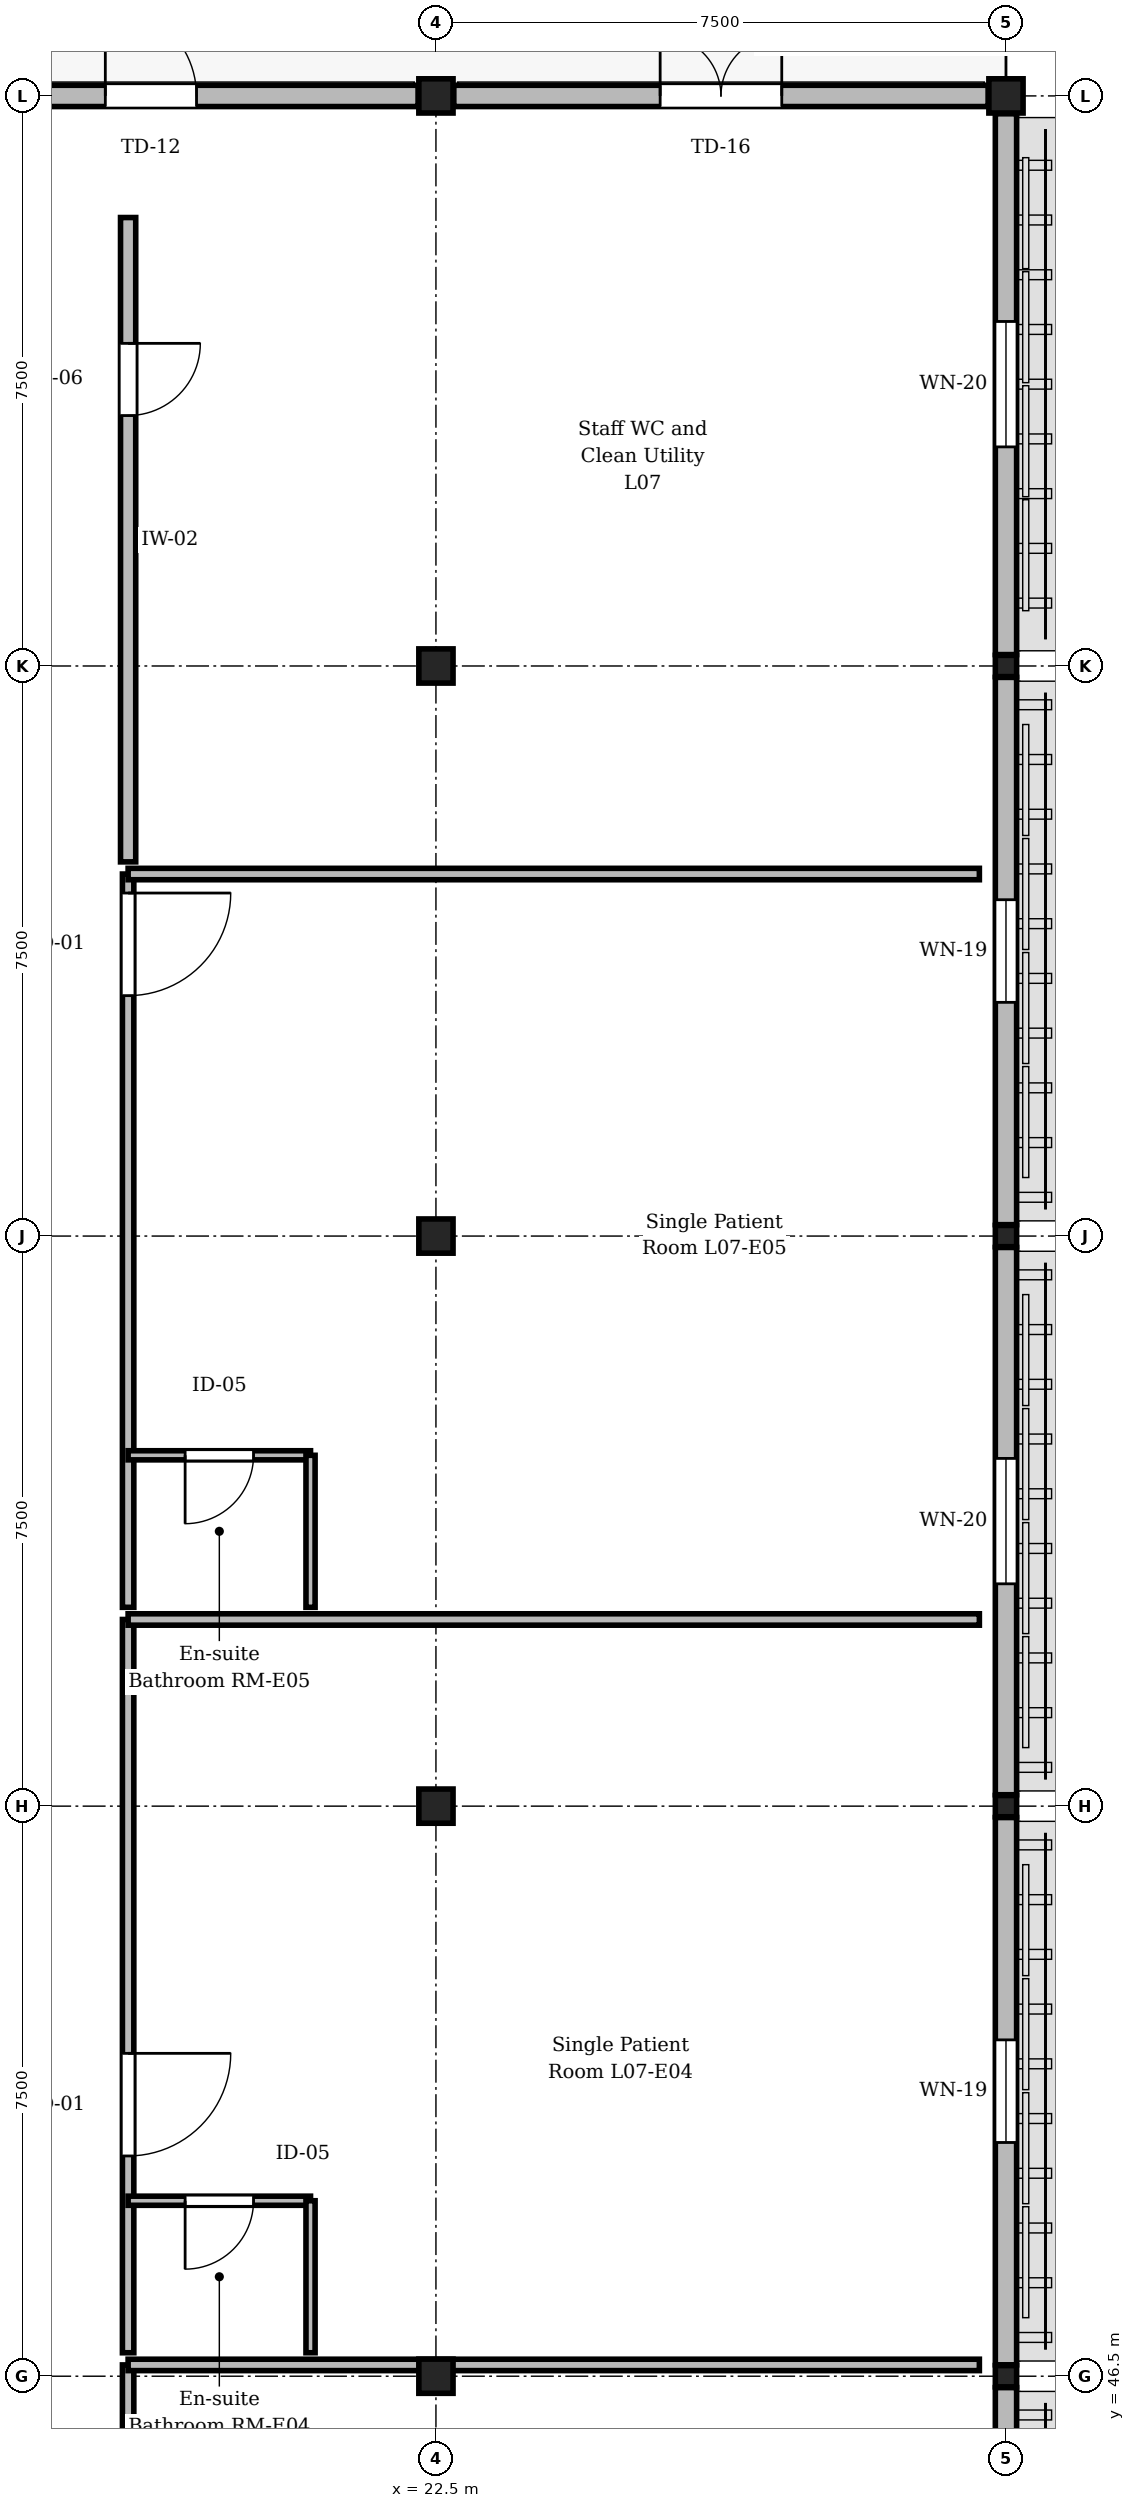
"""IFC4 building model, lengths in metres.
Left out: names, types, materials, properties, quantities, classifications, styles, units other than length and angle.
Written with IfcOpenShell. Run it as: python <this file> out.ifc"""

import sys

from ifc_helpers import new_model, si_unit, direction, frame, frame_2d, origin, origin_2d, place, context, subcontext, project, spatial, rectangle, extrude, element, fill, save


model = new_model("IFC4")
c1 = context("Model", 3, precision=1e-05, world=origin(), true_north=direction((0.0, 1.0)))
c2 = subcontext(c1, "Body", "Model", "MODEL_VIEW")
j1 = project(units=[si_unit("LENGTHUNIT", "METRE"), si_unit("PLANEANGLEUNIT", "RADIAN")], contexts=[c1])
p1 = place(None, origin())
s1 = spatial("IfcSite", under=j1, at=p1, CompositionType="ELEMENT")
p2 = place(p1, origin())
s2 = spatial("IfcBuilding", under=s1, at=p2, CompositionType="ELEMENT")
p3 = place(p2, frame((0.0, 0.0, 30.0)))
s3 = spatial("IfcBuildingStorey", under=s2, at=p3, CompositionType="ELEMENT", Elevation=30.0)
for number, where, z_axis, x_axis in (
    (1, (22.5, 46.5, 0.0), (0.0, 0.0, 1.0), (1.0, 0.0, 0.0)),
    (2, (22.5, 54.0, 0.0), (0.0, 0.0, 1.0), (1.0, 0.0, 0.0)),
    (3, (22.5, 61.5, 0.0), (0.0, 0.0, 1.0), (1.0, 0.0, 0.0)),
    (4, (22.5, 69.0, 0.0), (0.0, 0.0, 1.0), (1.0, 0.0, 0.0)),
    (5, (22.5, 76.5, 0.0), (0.0, 0.0, 1.0), (1.0, 0.0, 0.0)),
):
    element("IfcColumn", number, at=place(p3, frame(where, z_axis=z_axis, x_axis=x_axis)), inside=s3, PredefinedType="COLUMN", context=c2, shape_type="SweptSolid", body=[
        extrude(rectangle(XDim=0.45, YDim=0.45, at=origin_2d()), origin(), (0.0, 0.0, 1.0), 4.05),
    ])
for number, where, z_axis, x_axis in (
    (6, (30.0, 46.5, 0.0), (0.0, 0.0, 1.0), (1.0, 0.0, 0.0)),
    (7, (30.0, 54.0, 0.0), (0.0, 0.0, 1.0), (1.0, 0.0, 0.0)),
    (8, (30.0, 61.5, 0.0), (0.0, 0.0, 1.0), (1.0, 0.0, 0.0)),
    (9, (30.0, 69.0, 0.0), (0.0, 0.0, 1.0), (1.0, 0.0, 0.0)),
):
    element("IfcColumn", number, at=place(p3, frame(where, z_axis=z_axis, x_axis=x_axis)), inside=s3, PredefinedType="COLUMN", context=c2, shape_type="SweptSolid", body=[
        extrude(rectangle(XDim=0.28, YDim=0.28, at=origin_2d()), origin(), (0.0, 0.0, 1.0), 4.05),
    ])
p4 = place(p3, frame((30.0, 76.5, 0.0), z_axis=(0.0, 0.0, 1.0), x_axis=(1.0, 0.0, 0.0)))
e10 = element("IfcColumn", 10, at=p4, inside=s3, PredefinedType="COLUMN", context=c2, shape_type="SweptSolid", body=[
    extrude(rectangle(XDim=0.45, YDim=0.45, at=origin_2d()), origin(), (0.0, 0.0, 1.0), 4.05),
])
p5 = place(p3, frame((15.235, 76.5, 0.0), z_axis=(0.0, 0.0, 1.0), x_axis=(1.0, 0.0, 0.0)))
e11 = element("IfcWall", 11, at=p5, inside=s3, PredefinedType="STANDARD", context=c2, shape_type="SweptSolid", body=[
    extrude(rectangle(XDim=7.03, YDim=0.28, at=frame_2d((3.515, 0.0))), origin(), (0.0, 0.0, 1.0), 3.83),
])
p6 = place(p5, frame((2.915, 0.0, 0.0)))
e12 = element("IfcOpeningElement", 12, at=p6, cuts=e11, PredefinedType="OPENING", context=c2, shape_type="SweptSolid", body=[
    extrude(rectangle(XDim=1.2, YDim=2.3, at=frame_2d((0.6, 1.15))), frame((0.0, 0.15, 0.0), z_axis=(0.0, -1.0, 0.0), x_axis=(1.0, 0.0, 0.0)), (0.0, 0.0, 1.0), 0.3),
])
p7 = place(p3, frame((30.0, 46.35, 0.0), z_axis=(0.0, 0.0, 1.0), x_axis=(0.0, -1.0, 0.0)))
e13 = element("IfcWall", 13, at=p7, inside=s3, PredefinedType="STANDARD", context=c2, shape_type="SweptSolid", body=[
    extrude(rectangle(XDim=7.2, YDim=0.28, at=frame_2d((3.6, 0.0))), origin(), (0.0, 0.0, 1.0), 3.83),
])
p8 = place(p7, frame((2.775, 0.0, 0.85)))
e14 = element("IfcOpeningElement", 14, at=p8, cuts=e13, PredefinedType="OPENING", context=c2, shape_type="SweptSolid", body=[
    extrude(rectangle(XDim=1.65, YDim=2.25, at=frame_2d((0.825, 1.125))), frame((0.0, 0.15, 0.0), z_axis=(0.0, -1.0, 0.0), x_axis=(1.0, 0.0, 0.0)), (0.0, 0.0, 1.0), 0.3),
])
p9 = place(p3, frame((30.0, 53.85, 0.0), z_axis=(0.0, 0.0, 1.0), x_axis=(0.0, -1.0, 0.0)))
e15 = element("IfcWall", 15, at=p9, inside=s3, PredefinedType="STANDARD", context=c2, shape_type="SweptSolid", body=[
    extrude(rectangle(XDim=7.2, YDim=0.28, at=frame_2d((3.6, 0.0))), origin(), (0.0, 0.0, 1.0), 3.83),
])
p10 = place(p9, frame((2.925, 0.0, 0.85)))
e16 = element("IfcOpeningElement", 16, at=p10, cuts=e15, PredefinedType="OPENING", context=c2, shape_type="SweptSolid", body=[
    extrude(rectangle(XDim=1.35, YDim=2.25, at=frame_2d((0.675, 1.125))), frame((0.0, 0.15, 0.0), z_axis=(0.0, -1.0, 0.0), x_axis=(1.0, 0.0, 0.0)), (0.0, 0.0, 1.0), 0.3),
])
p11 = place(p3, frame((30.0, 61.35, 0.0), z_axis=(0.0, 0.0, 1.0), x_axis=(0.0, -1.0, 0.0)))
e17 = element("IfcWall", 17, at=p11, inside=s3, PredefinedType="STANDARD", context=c2, shape_type="SweptSolid", body=[
    extrude(rectangle(XDim=7.2, YDim=0.28, at=frame_2d((3.6, 0.0))), origin(), (0.0, 0.0, 1.0), 3.23),
])
p12 = place(p11, frame((2.775, 0.0, 0.85)))
e18 = element("IfcOpeningElement", 18, at=p12, cuts=e17, PredefinedType="OPENING", context=c2, shape_type="SweptSolid", body=[
    extrude(rectangle(XDim=1.65, YDim=2.1, at=frame_2d((0.825, 1.05))), frame((0.0, 0.15, 0.0), z_axis=(0.0, -1.0, 0.0), x_axis=(1.0, 0.0, 0.0)), (0.0, 0.0, 1.0), 0.3),
])
p13 = place(p3, frame((30.0, 68.85, 0.0), z_axis=(0.0, 0.0, 1.0), x_axis=(0.0, -1.0, 0.0)))
e19 = element("IfcWall", 19, at=p13, inside=s3, PredefinedType="STANDARD", context=c2, shape_type="SweptSolid", body=[
    extrude(rectangle(XDim=7.2, YDim=0.28, at=frame_2d((3.6, 0.0))), origin(), (0.0, 0.0, 1.0), 3.83),
])
p14 = place(p13, frame((2.925, 0.0, 0.85)))
e20 = element("IfcOpeningElement", 20, at=p14, cuts=e19, PredefinedType="OPENING", context=c2, shape_type="SweptSolid", body=[
    extrude(rectangle(XDim=1.35, YDim=2.25, at=frame_2d((0.675, 1.125))), frame((0.0, 0.15, 0.0), z_axis=(0.0, -1.0, 0.0), x_axis=(1.0, 0.0, 0.0)), (0.0, 0.0, 1.0), 0.3),
])
p15 = place(p3, frame((22.735, 76.5, 0.0), z_axis=(0.0, 0.0, 1.0), x_axis=(1.0, 0.0, 0.0)))
e21 = element("IfcWall", 21, at=p15, inside=s3, PredefinedType="STANDARD", context=c2, shape_type="SweptSolid", body=[
    extrude(rectangle(XDim=7.03, YDim=0.28, at=frame_2d((3.515, 0.0))), origin(), (0.0, 0.0, 1.0), 3.83),
])
p16 = place(p15, frame((2.715, 0.0, 0.0)))
e22 = element("IfcOpeningElement", 22, at=p16, cuts=e21, PredefinedType="OPENING", context=c2, shape_type="SweptSolid", body=[
    extrude(rectangle(XDim=1.6, YDim=2.35, at=frame_2d((0.8, 1.175))), frame((0.0, 0.15, 0.0), z_axis=(0.0, -1.0, 0.0), x_axis=(1.0, 0.0, 0.0)), (0.0, 0.0, 1.0), 0.3),
])
p17 = place(p3, frame((30.0, 76.265, 0.0), z_axis=(0.0, 0.0, 1.0), x_axis=(0.0, -1.0, 0.0)))
e23 = element("IfcWall", 23, at=p17, inside=s3, PredefinedType="STANDARD", context=c2, shape_type="SweptSolid", body=[
    extrude(rectangle(XDim=7.115, YDim=0.28, at=frame_2d((3.558, 0.0))), origin(), (0.0, 0.0, 1.0), 3.83),
])
p18 = place(p17, frame((2.732, 0.0, 0.85)))
e24 = element("IfcOpeningElement", 24, at=p18, cuts=e23, PredefinedType="OPENING", context=c2, shape_type="SweptSolid", body=[
    extrude(rectangle(XDim=1.65, YDim=2.25, at=frame_2d((0.825, 1.125))), frame((0.0, 0.15, 0.0), z_axis=(0.0, -1.0, 0.0), x_axis=(1.0, 0.0, 0.0)), (0.0, 0.0, 1.0), 0.3),
])
p19 = place(p3, frame((18.45, 46.649, 0.0), z_axis=(0.0, 0.0, 1.0), x_axis=(0.0, -1.0, 0.0)))
e25 = element("IfcWall", 25, at=p19, inside=s3, PredefinedType="PARTITIONING", context=c2, shape_type="SweptSolid", body=[
    extrude(rectangle(XDim=9.647, YDim=0.15, at=frame_2d((4.824, 0.0))), origin(), (0.0, 0.0, 1.0), 3.815),
])
p20 = place(p19, frame((3.369, 0.0, 0.0)))
e26 = element("IfcOpeningElement", 26, at=p20, cuts=e25, PredefinedType="OPENING", context=c2, shape_type="SweptSolid", body=[
    extrude(rectangle(XDim=1.35, YDim=2.25, at=frame_2d((0.675, 1.125))), frame((0.0, 0.085, 0.0), z_axis=(0.0, -1.0, 0.0), x_axis=(1.0, 0.0, 0.0)), (0.0, 0.0, 1.0), 0.17),
])
p21 = place(p3, frame((18.45, 56.456, 0.0), z_axis=(0.0, 0.0, 1.0), x_axis=(0.0, -1.0, 0.0)))
e27 = element("IfcWall", 27, at=p21, inside=s3, PredefinedType="PARTITIONING", context=c2, shape_type="SweptSolid", body=[
    extrude(rectangle(XDim=9.647, YDim=0.15, at=frame_2d((4.824, 0.0))), origin(), (0.0, 0.0, 1.0), 3.815),
])
p22 = place(p21, frame((5.708, 0.0, 0.0)))
e28 = element("IfcOpeningElement", 28, at=p22, cuts=e27, PredefinedType="OPENING", context=c2, shape_type="SweptSolid", body=[
    extrude(rectangle(XDim=1.35, YDim=2.25, at=frame_2d((0.675, 1.125))), frame((0.0, 0.085, 0.0), z_axis=(0.0, -1.0, 0.0), x_axis=(1.0, 0.0, 0.0)), (0.0, 0.0, 1.0), 0.17),
])
p23 = place(p3, frame((20.85, 48.809, 0.0), z_axis=(0.0, 0.0, 1.0), x_axis=(-1.0, 0.0, 0.0)))
e29 = element("IfcWall", 29, at=p23, inside=s3, PredefinedType="PARTITIONING", context=c2, shape_type="SweptSolid", body=[
    extrude(rectangle(XDim=2.4, YDim=0.12, at=frame_2d((1.2, 0.0))), origin(), (0.0, 0.0, 1.0), 3.815),
])
p24 = place(p23, frame((0.75, 0.0, 0.0)))
e30 = element("IfcOpeningElement", 30, at=p24, cuts=e29, PredefinedType="OPENING", context=c2, shape_type="SweptSolid", body=[
    extrude(rectangle(XDim=0.9, YDim=2.1, at=frame_2d((0.45, 1.05))), frame((0.0, 0.07, 0.0), z_axis=(0.0, -1.0, 0.0), x_axis=(1.0, 0.0, 0.0)), (0.0, 0.0, 1.0), 0.14),
])
p25 = place(p3, frame((20.85, 46.809, 0.0), z_axis=(0.0, 0.0, 1.0), x_axis=(0.0, 1.0, 0.0)))
e31 = element("IfcWall", 31, at=p25, inside=s3, PredefinedType="PARTITIONING", context=c2, shape_type="SweptSolid", body=[
    extrude(rectangle(XDim=2.0, YDim=0.12, at=frame_2d((1.0, 0.0))), origin(), (0.0, 0.0, 1.0), 3.815),
])
p26 = place(p3, frame((18.45, 66.263, 0.0), z_axis=(0.0, 0.0, 1.0), x_axis=(0.0, -1.0, 0.0)))
e32 = element("IfcWall", 32, at=p26, inside=s3, PredefinedType="PARTITIONING", context=c2, shape_type="SweptSolid", body=[
    extrude(rectangle(XDim=9.647, YDim=0.15, at=frame_2d((4.824, 0.0))), origin(), (0.0, 0.0, 1.0), 3.815),
])
p27 = place(p26, frame((0.25, 0.0, 0.0)))
e33 = element("IfcOpeningElement", 33, at=p27, cuts=e32, PredefinedType="OPENING", context=c2, shape_type="SweptSolid", body=[
    extrude(rectangle(XDim=1.35, YDim=2.25, at=frame_2d((0.675, 1.125))), frame((0.0, 0.085, 0.0), z_axis=(0.0, -1.0, 0.0), x_axis=(1.0, 0.0, 0.0)), (0.0, 0.0, 1.0), 0.17),
])
p28 = place(p3, frame((20.85, 58.616, 0.0), z_axis=(0.0, 0.0, 1.0), x_axis=(-1.0, 0.0, 0.0)))
e34 = element("IfcWall", 34, at=p28, inside=s3, PredefinedType="PARTITIONING", context=c2, shape_type="SweptSolid", body=[
    extrude(rectangle(XDim=2.4, YDim=0.12, at=frame_2d((1.2, 0.0))), origin(), (0.0, 0.0, 1.0), 3.815),
])
p29 = place(p28, frame((0.75, 0.0, 0.0)))
e35 = element("IfcOpeningElement", 35, at=p29, cuts=e34, PredefinedType="OPENING", context=c2, shape_type="SweptSolid", body=[
    extrude(rectangle(XDim=0.9, YDim=2.1, at=frame_2d((0.45, 1.05))), frame((0.0, 0.07, 0.0), z_axis=(0.0, -1.0, 0.0), x_axis=(1.0, 0.0, 0.0)), (0.0, 0.0, 1.0), 0.14),
])
p30 = place(p3, frame((20.85, 56.616, 0.0), z_axis=(0.0, 0.0, 1.0), x_axis=(0.0, 1.0, 0.0)))
e36 = element("IfcWall", 36, at=p30, inside=s3, PredefinedType="PARTITIONING", context=c2, shape_type="SweptSolid", body=[
    extrude(rectangle(XDim=2.0, YDim=0.12, at=frame_2d((1.0, 0.0))), origin(), (0.0, 0.0, 1.0), 3.815),
])
p31 = place(p3, frame((18.45, 74.9, 0.0), z_axis=(0.0, 0.0, 1.0), x_axis=(0.0, -1.0, 0.0)))
e37 = element("IfcWall", 37, at=p31, inside=s3, PredefinedType="STANDARD", context=c2, shape_type="SweptSolid", body=[
    extrude(rectangle(XDim=8.477, YDim=0.2, at=frame_2d((4.239, 0.0))), origin(), (0.0, 0.0, 1.0), 3.815),
])
p32 = place(p31, frame((1.656, 0.0, 0.0)))
e38 = element("IfcOpeningElement", 38, at=p32, cuts=e37, PredefinedType="OPENING", context=c2, shape_type="SweptSolid", body=[
    extrude(rectangle(XDim=0.95, YDim=2.15, at=frame_2d((0.475, 1.075))), frame((0.0, 0.11, 0.0), z_axis=(0.0, -1.0, 0.0), x_axis=(1.0, 0.0, 0.0)), (0.0, 0.0, 1.0), 0.22),
])
for number, where, z_axis, x_axis in (
    (39, (18.45, 46.649, 0.0), (0.0, 0.0, 1.0), (1.0, 0.0, 0.0)),
    (40, (18.45, 56.456, 0.0), (0.0, 0.0, 1.0), (1.0, 0.0, 0.0)),
    (41, (18.45, 66.263, 0.0), (0.0, 0.0, 1.0), (1.0, 0.0, 0.0)),
):
    element("IfcWall", number, at=place(p3, frame(where, z_axis=z_axis, x_axis=x_axis)), inside=s3, PredefinedType="PARTITIONING", context=c2, shape_type="SweptSolid", body=[
        extrude(rectangle(XDim=11.2, YDim=0.15, at=frame_2d((5.6, 0.0))), origin(), (0.0, 0.0, 1.0), 3.815),
    ])
p33 = place(p6, origin())
e42 = element("IfcDoor", 42, at=p33, inside=s3, OperationType="SINGLE_SWING_LEFT", PredefinedType="DOOR", context=c2, shape_type="SweptSolid", body=[
    extrude(rectangle(XDim=1.2, YDim=2.3, at=frame_2d((0.6, 1.15))), frame((0.0, 0.025, 0.0), z_axis=(0.0, -1.0, 0.0), x_axis=(1.0, 0.0, 0.0)), (0.0, 0.0, 1.0), 0.05),
])
fill(e12, e42)
p34 = place(p10, origin())
e43 = element("IfcWindow", 43, at=p34, inside=s3, PartitioningType="SINGLE_PANEL", PredefinedType="WINDOW", context=c2, shape_type="SweptSolid", body=[
    extrude(rectangle(XDim=1.35, YDim=2.25, at=frame_2d((0.675, 1.125))), frame((0.0, 0.03, 0.0), z_axis=(0.0, -1.0, 0.0), x_axis=(1.0, 0.0, 0.0)), (0.0, 0.0, 1.0), 0.06),
])
fill(e16, e43)
p35 = place(p12, origin())
e44 = element("IfcWindow", 44, at=p35, inside=s3, PartitioningType="SINGLE_PANEL", PredefinedType="WINDOW", context=c2, shape_type="SweptSolid", body=[
    extrude(rectangle(XDim=1.65, YDim=2.1, at=frame_2d((0.825, 1.05))), frame((0.0, 0.03, 0.0), z_axis=(0.0, -1.0, 0.0), x_axis=(1.0, 0.0, 0.0)), (0.0, 0.0, 1.0), 0.06),
])
fill(e18, e44)
p36 = place(p14, origin())
e45 = element("IfcWindow", 45, at=p36, inside=s3, PartitioningType="SINGLE_PANEL", PredefinedType="WINDOW", context=c2, shape_type="SweptSolid", body=[
    extrude(rectangle(XDim=1.35, YDim=2.25, at=frame_2d((0.675, 1.125))), frame((0.0, 0.03, 0.0), z_axis=(0.0, -1.0, 0.0), x_axis=(1.0, 0.0, 0.0)), (0.0, 0.0, 1.0), 0.06),
])
fill(e20, e45)
p37 = place(p16, origin())
e46 = element("IfcDoor", 46, at=p37, inside=s3, OperationType="DOUBLE_DOOR_SINGLE_SWING", PredefinedType="DOOR", context=c2, shape_type="SweptSolid", body=[
    extrude(rectangle(XDim=1.6, YDim=2.35, at=frame_2d((0.8, 1.175))), frame((0.0, 0.025, 0.0), z_axis=(0.0, -1.0, 0.0), x_axis=(1.0, 0.0, 0.0)), (0.0, 0.0, 1.0), 0.05),
])
fill(e22, e46)
p38 = place(p18, origin())
e47 = element("IfcWindow", 47, at=p38, inside=s3, PartitioningType="SINGLE_PANEL", PredefinedType="WINDOW", context=c2, shape_type="SweptSolid", body=[
    extrude(rectangle(XDim=1.65, YDim=2.25, at=frame_2d((0.825, 1.125))), frame((0.0, 0.03, 0.0), z_axis=(0.0, -1.0, 0.0), x_axis=(1.0, 0.0, 0.0)), (0.0, 0.0, 1.0), 0.06),
])
fill(e24, e47)
p39 = place(p22, origin())
e48 = element("IfcDoor", 48, at=p39, inside=s3, OperationType="SINGLE_SWING_LEFT", PredefinedType="DOOR", context=c2, shape_type="SweptSolid", body=[
    extrude(rectangle(XDim=1.35, YDim=2.25, at=frame_2d((0.675, 1.125))), frame((0.0, 0.025, 0.0), z_axis=(0.0, -1.0, 0.0), x_axis=(1.0, 0.0, 0.0)), (0.0, 0.0, 1.0), 0.05),
])
fill(e28, e48)
p40 = place(p24, origin())
e49 = element("IfcDoor", 49, at=p40, inside=s3, OperationType="SINGLE_SWING_RIGHT", PredefinedType="DOOR", context=c2, shape_type="SweptSolid", body=[
    extrude(rectangle(XDim=0.9, YDim=2.1, at=frame_2d((0.45, 1.05))), frame((0.0, 0.025, 0.0), z_axis=(0.0, -1.0, 0.0), x_axis=(1.0, 0.0, 0.0)), (0.0, 0.0, 1.0), 0.05),
])
fill(e30, e49)
p41 = place(p27, origin())
e50 = element("IfcDoor", 50, at=p41, inside=s3, OperationType="SINGLE_SWING_LEFT", PredefinedType="DOOR", context=c2, shape_type="SweptSolid", body=[
    extrude(rectangle(XDim=1.35, YDim=2.25, at=frame_2d((0.675, 1.125))), frame((0.0, 0.025, 0.0), z_axis=(0.0, -1.0, 0.0), x_axis=(1.0, 0.0, 0.0)), (0.0, 0.0, 1.0), 0.05),
])
fill(e33, e50)
p42 = place(p29, origin())
e51 = element("IfcDoor", 51, at=p42, inside=s3, OperationType="SINGLE_SWING_RIGHT", PredefinedType="DOOR", context=c2, shape_type="SweptSolid", body=[
    extrude(rectangle(XDim=0.9, YDim=2.1, at=frame_2d((0.45, 1.05))), frame((0.0, 0.025, 0.0), z_axis=(0.0, -1.0, 0.0), x_axis=(1.0, 0.0, 0.0)), (0.0, 0.0, 1.0), 0.05),
])
fill(e35, e51)
p43 = place(p32, origin())
e52 = element("IfcDoor", 52, at=p43, inside=s3, OperationType="SINGLE_SWING_LEFT", PredefinedType="DOOR", context=c2, shape_type="SweptSolid", body=[
    extrude(rectangle(XDim=0.95, YDim=2.15, at=frame_2d((0.475, 1.075))), frame((0.0, 0.025, 0.0), z_axis=(0.0, -1.0, 0.0), x_axis=(1.0, 0.0, 0.0)), (0.0, 0.0, 1.0), 0.05),
])
fill(e38, e52)
save(model, sys.argv[1])
